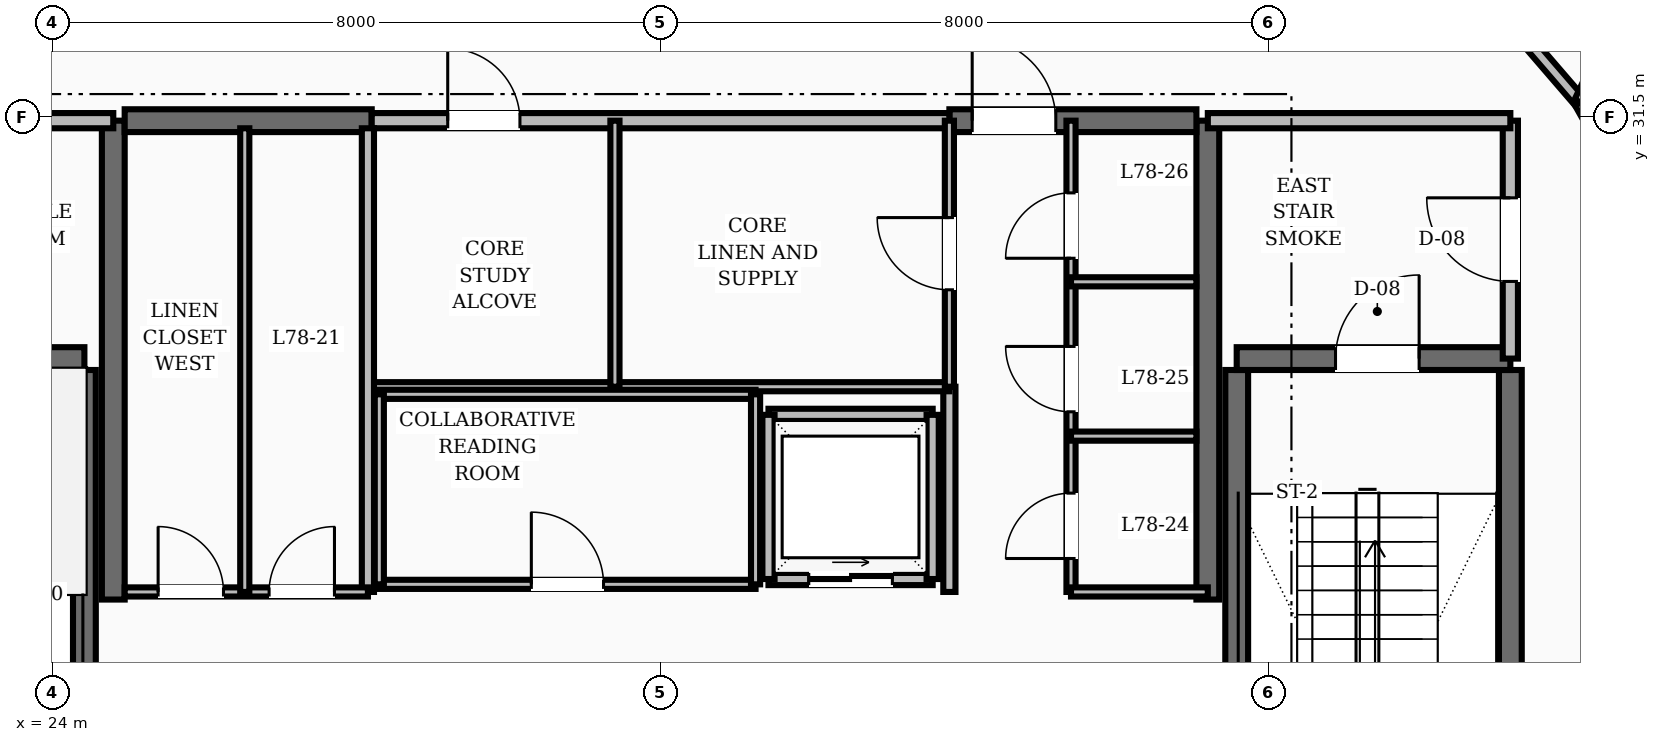
"""IFC4 building model, lengths in metres.
Left out: names, types, materials, properties, quantities, classifications, styles, units other than length and angle.
Written with IfcOpenShell. Run it as: python <this file> out.ifc"""

import sys

from ifc_helpers import new_model, si_unit, direction, frame, frame_2d, origin, place, context, subcontext, project, spatial, rectangle, extrude, element, fill, save


model = new_model("IFC4")
c1 = context("Model", 3, precision=1e-05, world=origin(), true_north=direction((0.0, 1.0)))
c2 = subcontext(c1, "Body", "Model", "MODEL_VIEW")
j1 = project(units=[si_unit("LENGTHUNIT", "METRE"), si_unit("PLANEANGLEUNIT", "RADIAN")], contexts=[c1])
p1 = place(None, origin())
s1 = spatial("IfcSite", under=j1, at=p1, CompositionType="ELEMENT")
p2 = place(p1, origin())
s2 = spatial("IfcBuilding", under=s1, at=p2, CompositionType="ELEMENT")
p3 = place(p2, frame((0.0, 0.0, 297.6)))
s3 = spatial("IfcBuildingStorey", under=s2, at=p3, CompositionType="ELEMENT", Elevation=297.6)
for number, where, z_axis, x_axis in (
    (1, (24.8, 25.15, 0.0), (0.0, 0.0, 1.0), (0.0, 1.0, 0.0)),
    (2, (39.2, 25.15, 0.0), (0.0, 0.0, 1.0), (0.0, 1.0, 0.0)),
):
    element("IfcWall", number, at=place(p3, frame(where, z_axis=z_axis, x_axis=x_axis)), inside=s3, PredefinedType="SHEAR", context=c2, shape_type="SweptSolid", body=[
        extrude(rectangle(XDim=6.3, YDim=0.3, at=frame_2d((3.15, 0.0))), origin(), (0.0, 0.0, 1.0), 4.8),
    ])
p4 = place(p3, frame((24.95, 31.45, 0.0), z_axis=(0.0, 0.0, 1.0), x_axis=(1.0, 0.0, 0.0)))
e3 = element("IfcWall", 3, at=p4, inside=s3, PredefinedType="SHEAR", context=c2, shape_type="SweptSolid", body=[
    extrude(rectangle(XDim=3.25, YDim=0.3, at=frame_2d((1.625, 0.0))), origin(), (0.0, 0.0, 1.0), 4.8),
])
p5 = place(p3, frame((35.8, 31.45, 0.0), z_axis=(0.0, 0.0, 1.0), x_axis=(1.0, 0.0, 0.0)))
e4 = element("IfcWall", 4, at=p5, inside=s3, PredefinedType="SHEAR", context=c2, shape_type="SweptSolid", body=[
    extrude(rectangle(XDim=3.25, YDim=0.3, at=frame_2d((1.625, 0.0))), origin(), (0.0, 0.0, 1.0), 4.8),
])
p6 = place(p5, frame((0.3, 0.0, 0.0)))
e5 = element("IfcOpeningElement", 5, at=p6, cuts=e4, PredefinedType="OPENING", context=c2, shape_type="SweptSolid", body=[
    extrude(rectangle(XDim=1.1, YDim=2.1, at=frame_2d((0.55, 1.05))), frame((0.0, 0.16, 0.0), z_axis=(0.0, -1.0, 0.0), x_axis=(1.0, 0.0, 0.0)), (0.0, 0.0, 1.0), 0.32),
])
p7 = place(p3, frame((24.42, 19.43, 0.0), z_axis=(0.0, 0.0, 1.0), x_axis=(0.0, 1.0, 0.0)))
e6 = element("IfcWall", 6, at=p7, inside=s3, PredefinedType="SHEAR", context=c2, shape_type="SweptSolid", body=[
    extrude(rectangle(XDim=8.74, YDim=0.3, at=frame_2d((4.37, 0.0))), origin(), (0.0, 0.0, 1.0), 4.8),
])
p8 = place(p3, frame((20.82, 28.32, 0.0), z_axis=(0.0, 0.0, 1.0), x_axis=(1.0, 0.0, 0.0)))
e7 = element("IfcWall", 7, at=p8, inside=s3, PredefinedType="SHEAR", context=c2, shape_type="SweptSolid", body=[
    extrude(rectangle(XDim=3.6, YDim=0.3, at=frame_2d((1.8, 0.0))), origin(), (0.0, 0.0, 1.0), 4.8),
])
for number, where, z_axis, x_axis in (
    (8, (43.18, 19.43, 0.0), (0.0, 0.0, 1.0), (0.0, 1.0, 0.0)),
    (9, (39.58, 19.43, 0.0), (0.0, 0.0, 1.0), (0.0, 1.0, 0.0)),
):
    element("IfcWall", number, at=place(p3, frame(where, z_axis=z_axis, x_axis=x_axis)), inside=s3, PredefinedType="SHEAR", context=c2, shape_type="SweptSolid", body=[
        extrude(rectangle(XDim=8.74, YDim=0.3, at=frame_2d((4.37, 0.0))), origin(), (0.0, 0.0, 1.0), 4.8),
    ])
p9 = place(p3, frame((39.58, 28.32, 0.0), z_axis=(0.0, 0.0, 1.0), x_axis=(1.0, 0.0, 0.0)))
e10 = element("IfcWall", 10, at=p9, inside=s3, PredefinedType="SHEAR", context=c2, shape_type="SweptSolid", body=[
    extrude(rectangle(XDim=3.6, YDim=0.3, at=frame_2d((1.8, 0.0))), origin(), (0.0, 0.0, 1.0), 4.8),
])
p10 = place(p9, frame((1.3, 0.0, 0.0)))
e11 = element("IfcOpeningElement", 11, at=p10, cuts=e10, PredefinedType="OPENING", context=c2, shape_type="SweptSolid", body=[
    extrude(rectangle(XDim=1.1, YDim=2.1, at=frame_2d((0.55, 1.05))), frame((0.0, 0.16, 0.0), z_axis=(0.0, -1.0, 0.0), x_axis=(1.0, 0.0, 0.0)), (0.0, 0.0, 1.0), 0.32),
])
p11 = place(p3, frame((43.18, 28.32, 0.0), z_axis=(0.0, 0.0, 1.0), x_axis=(0.0, 1.0, 0.0)))
e12 = element("IfcWall", 12, at=p11, inside=s3, PredefinedType="SOLIDWALL", context=c2, shape_type="SweptSolid", body=[
    extrude(rectangle(XDim=3.13, YDim=0.2, at=frame_2d((1.565, 0.0))), origin(), (0.0, 0.0, 1.0), 3.71),
])
p12 = place(p11, frame((1.015, 0.0, 0.0)))
e13 = element("IfcOpeningElement", 13, at=p12, cuts=e12, PredefinedType="OPENING", context=c2, shape_type="SweptSolid", body=[
    extrude(rectangle(XDim=1.1, YDim=2.1, at=frame_2d((0.55, 1.05))), frame((0.0, 0.11, 0.0), z_axis=(0.0, -1.0, 0.0), x_axis=(1.0, 0.0, 0.0)), (0.0, 0.0, 1.0), 0.22),
])
for number, where, z_axis, x_axis in (
    (14, (39.2, 31.45, 0.0), (0.0, 0.0, 1.0), (1.0, 0.0, 0.0)),
    (15, (20.82, 31.45, 0.0), (0.0, 0.0, 1.0), (1.0, 0.0, 0.0)),
):
    element("IfcWall", number, at=place(p3, frame(where, z_axis=z_axis, x_axis=x_axis)), inside=s3, PredefinedType="SOLIDWALL", context=c2, shape_type="SweptSolid", body=[
        extrude(rectangle(XDim=3.98, YDim=0.2, at=frame_2d((1.99, 0.0))), origin(), (0.0, 0.0, 1.0), 3.71),
    ])
p13 = place(p3, frame((35.8, 25.25, 0.0), z_axis=(0.0, 0.0, 1.0), x_axis=(0.0, 1.0, 0.0)))
e16 = element("IfcWall", 16, at=p13, inside=s3, PredefinedType="SOLIDWALL", context=c2, shape_type="SweptSolid", body=[
    extrude(rectangle(XDim=2.7, YDim=0.16, at=frame_2d((1.35, 0.0))), origin(), (0.0, 0.0, 1.0), 3.71),
])
p14 = place(p3, frame((33.42, 25.42, 0.0), z_axis=(0.0, 0.0, 1.0), x_axis=(1.0, 0.0, 0.0)))
e17 = element("IfcWall", 17, at=p14, inside=s3, PredefinedType="SOLIDWALL", context=c2, shape_type="SweptSolid", body=[
    extrude(rectangle(XDim=2.16, YDim=0.16, at=frame_2d((1.08, 0.0))), origin(), (0.0, 0.0, 1.0), 3.71),
])
p15 = place(p14, frame((0.53, 0.0, 0.0)))
e18 = element("IfcOpeningElement", 18, at=p15, cuts=e17, PredefinedType="OPENING", context=c2, shape_type="SweptSolid", body=[
    extrude(rectangle(XDim=1.1, YDim=2.15, at=frame_2d((0.55, 1.075))), frame((0.0, 0.09, 0.0), z_axis=(0.0, -1.0, 0.0), x_axis=(1.0, 0.0, 0.0)), (0.0, 0.0, 1.0), 0.18),
])
for number, where, z_axis, x_axis in (
    (19, (33.42, 27.58, 0.0), (0.0, 0.0, 1.0), (1.0, 0.0, 0.0)),
    (20, (33.42, 25.42, 0.0), (0.0, 0.0, 1.0), (0.0, 1.0, 0.0)),
    (21, (35.58, 25.42, 0.0), (0.0, 0.0, 1.0), (0.0, 1.0, 0.0)),
):
    element("IfcWall", number, at=place(p3, frame(where, z_axis=z_axis, x_axis=x_axis)), inside=s3, PredefinedType="SOLIDWALL", context=c2, shape_type="SweptSolid", body=[
        extrude(rectangle(XDim=2.16, YDim=0.16, at=frame_2d((1.08, 0.0))), origin(), (0.0, 0.0, 1.0), 3.71),
    ])
p16 = place(p3, frame((28.2, 31.45, 0.0), z_axis=(0.0, 0.0, 1.0), x_axis=(1.0, 0.0, 0.0)))
e22 = element("IfcWall", 22, at=p16, inside=s3, PredefinedType="SOLIDWALL", context=c2, shape_type="SweptSolid", body=[
    extrude(rectangle(XDim=7.6, YDim=0.2, at=frame_2d((3.8, 0.0))), origin(), (0.0, 0.0, 1.0), 3.71),
])
p17 = place(p16, frame((1.0, 0.0, 0.0)))
e23 = element("IfcOpeningElement", 23, at=p17, cuts=e22, PredefinedType="OPENING", context=c2, shape_type="SweptSolid", body=[
    extrude(rectangle(XDim=0.95, YDim=2.1, at=frame_2d((0.475, 1.05))), frame((0.0, 0.11, 0.0), z_axis=(0.0, -1.0, 0.0), x_axis=(1.0, 0.0, 0.0)), (0.0, 0.0, 1.0), 0.22),
])
p18 = place(p3, frame((28.2, 27.95, 0.0), z_axis=(0.0, 0.0, 1.0), x_axis=(1.0, 0.0, 0.0)))
e24 = element("IfcWall", 24, at=p18, inside=s3, PredefinedType="PARTITIONING", context=c2, shape_type="SweptSolid", body=[
    extrude(rectangle(XDim=7.6, YDim=0.12, at=frame_2d((3.8, 0.0))), origin(), (0.0, 0.0, 1.0), 3.71),
])
p19 = place(p3, frame((35.8, 27.95, 0.0), z_axis=(0.0, 0.0, 1.0), x_axis=(0.0, 1.0, 0.0)))
e25 = element("IfcWall", 25, at=p19, inside=s3, PredefinedType="PARTITIONING", context=c2, shape_type="SweptSolid", body=[
    extrude(rectangle(XDim=3.5, YDim=0.12, at=frame_2d((1.75, 0.0))), origin(), (0.0, 0.0, 1.0), 3.71),
])
p20 = place(p19, frame((1.275, 0.0, 0.0)))
e26 = element("IfcOpeningElement", 26, at=p20, cuts=e25, PredefinedType="OPENING", context=c2, shape_type="SweptSolid", body=[
    extrude(rectangle(XDim=0.95, YDim=2.1, at=frame_2d((0.475, 1.05))), frame((0.0, 0.07, 0.0), z_axis=(0.0, -1.0, 0.0), x_axis=(1.0, 0.0, 0.0)), (0.0, 0.0, 1.0), 0.14),
])
p21 = place(p3, frame((31.4, 27.95, 0.0), z_axis=(0.0, 0.0, 1.0), x_axis=(0.0, 1.0, 0.0)))
e27 = element("IfcWall", 27, at=p21, inside=s3, PredefinedType="PARTITIONING", context=c2, shape_type="SweptSolid", body=[
    extrude(rectangle(XDim=3.5, YDim=0.12, at=frame_2d((1.75, 0.0))), origin(), (0.0, 0.0, 1.0), 3.71),
])
p22 = place(p3, frame((28.3, 25.35, 0.0), z_axis=(0.0, 0.0, 1.0), x_axis=(1.0, 0.0, 0.0)))
e28 = element("IfcWall", 28, at=p22, inside=s3, PredefinedType="PARTITIONING", context=c2, shape_type="SweptSolid", body=[
    extrude(rectangle(XDim=4.95, YDim=0.12, at=frame_2d((2.475, 0.0))), origin(), (0.0, 0.0, 1.0), 3.71),
])
p23 = place(p22, frame((2.0, 0.0, 0.0)))
e29 = element("IfcOpeningElement", 29, at=p23, cuts=e28, PredefinedType="OPENING", context=c2, shape_type="SweptSolid", body=[
    extrude(rectangle(XDim=0.95, YDim=2.1, at=frame_2d((0.475, 1.05))), frame((0.0, 0.07, 0.0), z_axis=(0.0, -1.0, 0.0), x_axis=(1.0, 0.0, 0.0)), (0.0, 0.0, 1.0), 0.14),
])
p24 = place(p3, frame((28.3, 27.85, 0.0), z_axis=(0.0, 0.0, 1.0), x_axis=(1.0, 0.0, 0.0)))
e30 = element("IfcWall", 30, at=p24, inside=s3, PredefinedType="PARTITIONING", context=c2, shape_type="SweptSolid", body=[
    extrude(rectangle(XDim=4.95, YDim=0.12, at=frame_2d((2.475, 0.0))), origin(), (0.0, 0.0, 1.0), 3.71),
])
for number, where, z_axis, x_axis in (
    (31, (28.3, 25.35, 0.0), (0.0, 0.0, 1.0), (0.0, 1.0, 0.0)),
    (32, (33.25, 25.35, 0.0), (0.0, 0.0, 1.0), (0.0, 1.0, 0.0)),
):
    element("IfcWall", number, at=place(p3, frame(where, z_axis=z_axis, x_axis=x_axis)), inside=s3, PredefinedType="PARTITIONING", context=c2, shape_type="SweptSolid", body=[
        extrude(rectangle(XDim=2.5, YDim=0.12, at=frame_2d((1.25, 0.0))), origin(), (0.0, 0.0, 1.0), 3.71),
    ])
p25 = place(p3, frame((28.15, 25.25, 0.0), z_axis=(0.0, 0.0, 1.0), x_axis=(0.0, 1.0, 0.0)))
e33 = element("IfcWall", 33, at=p25, inside=s3, PredefinedType="SOLIDWALL", context=c2, shape_type="SweptSolid", body=[
    extrude(rectangle(XDim=6.1, YDim=0.16, at=frame_2d((3.05, 0.0))), origin(), (0.0, 0.0, 1.0), 3.71),
])
p26 = place(p3, frame((24.95, 25.25, 0.0), z_axis=(0.0, 0.0, 1.0), x_axis=(1.0, 0.0, 0.0)))
e34 = element("IfcWall", 34, at=p26, inside=s3, PredefinedType="PARTITIONING", context=c2, shape_type="SweptSolid", body=[
    extrude(rectangle(XDim=3.2, YDim=0.12, at=frame_2d((1.6, 0.0))), origin(), (0.0, 0.0, 1.0), 3.71),
])
p27 = place(p26, frame((0.44, 0.0, 0.0)))
e35 = element("IfcOpeningElement", 35, at=p27, cuts=e34, PredefinedType="OPENING", context=c2, shape_type="SweptSolid", body=[
    extrude(rectangle(XDim=0.86, YDim=2.1, at=frame_2d((0.43, 1.05))), frame((0.0, 0.07, 0.0), z_axis=(0.0, -1.0, 0.0), x_axis=(1.0, 0.0, 0.0)), (0.0, 0.0, 1.0), 0.14),
])
p28 = place(p26, frame((1.9, 0.0, 0.0)))
e36 = element("IfcOpeningElement", 36, at=p28, cuts=e34, PredefinedType="OPENING", context=c2, shape_type="SweptSolid", body=[
    extrude(rectangle(XDim=0.86, YDim=2.1, at=frame_2d((0.43, 1.05))), frame((0.0, 0.07, 0.0), z_axis=(0.0, -1.0, 0.0), x_axis=(1.0, 0.0, 0.0)), (0.0, 0.0, 1.0), 0.14),
])
p29 = place(p3, frame((37.4, 25.25, 0.0), z_axis=(0.0, 0.0, 1.0), x_axis=(0.0, 1.0, 0.0)))
e37 = element("IfcWall", 37, at=p29, inside=s3, PredefinedType="PARTITIONING", context=c2, shape_type="SweptSolid", body=[
    extrude(rectangle(XDim=6.2, YDim=0.12, at=frame_2d((3.1, 0.0))), origin(), (0.0, 0.0, 1.0), 3.71),
])
p30 = place(p29, frame((0.44, 0.0, 0.0)))
e38 = element("IfcOpeningElement", 38, at=p30, cuts=e37, PredefinedType="OPENING", context=c2, shape_type="SweptSolid", body=[
    extrude(rectangle(XDim=0.86, YDim=2.1, at=frame_2d((0.43, 1.05))), frame((0.0, 0.07, 0.0), z_axis=(0.0, -1.0, 0.0), x_axis=(1.0, 0.0, 0.0)), (0.0, 0.0, 1.0), 0.14),
])
p31 = place(p29, frame((2.37, 0.0, 0.0)))
e39 = element("IfcOpeningElement", 39, at=p31, cuts=e37, PredefinedType="OPENING", context=c2, shape_type="SweptSolid", body=[
    extrude(rectangle(XDim=0.86, YDim=2.1, at=frame_2d((0.43, 1.05))), frame((0.0, 0.07, 0.0), z_axis=(0.0, -1.0, 0.0), x_axis=(1.0, 0.0, 0.0)), (0.0, 0.0, 1.0), 0.14),
])
p32 = place(p29, frame((4.39, 0.0, 0.0)))
e40 = element("IfcOpeningElement", 40, at=p32, cuts=e37, PredefinedType="OPENING", context=c2, shape_type="SweptSolid", body=[
    extrude(rectangle(XDim=0.86, YDim=2.1, at=frame_2d((0.43, 1.05))), frame((0.0, 0.07, 0.0), z_axis=(0.0, -1.0, 0.0), x_axis=(1.0, 0.0, 0.0)), (0.0, 0.0, 1.0), 0.14),
])
p33 = place(p3, frame((37.4, 25.25, 0.0), z_axis=(0.0, 0.0, 1.0), x_axis=(1.0, 0.0, 0.0)))
e41 = element("IfcWall", 41, at=p33, inside=s3, PredefinedType="PARTITIONING", context=c2, shape_type="SweptSolid", body=[
    extrude(rectangle(XDim=1.8, YDim=0.12, at=frame_2d((0.9, 0.0))), origin(), (0.0, 0.0, 1.0), 3.71),
])
p34 = place(p3, frame((26.53, 25.25, 0.0), z_axis=(0.0, 0.0, 1.0), x_axis=(0.0, 1.0, 0.0)))
e42 = element("IfcWall", 42, at=p34, inside=s3, PredefinedType="PARTITIONING", context=c2, shape_type="SweptSolid", body=[
    extrude(rectangle(XDim=6.1, YDim=0.12, at=frame_2d((3.05, 0.0))), origin(), (0.0, 0.0, 1.0), 3.71),
])
for number, where, z_axis, x_axis in (
    (43, (37.4, 27.3, 0.0), (0.0, 0.0, 1.0), (1.0, 0.0, 0.0)),
    (44, (37.4, 29.33, 0.0), (0.0, 0.0, 1.0), (1.0, 0.0, 0.0)),
):
    element("IfcWall", number, at=place(p3, frame(where, z_axis=z_axis, x_axis=x_axis)), inside=s3, PredefinedType="PARTITIONING", context=c2, shape_type="SweptSolid", body=[
        extrude(rectangle(XDim=1.65, YDim=0.12, at=frame_2d((0.825, 0.0))), origin(), (0.0, 0.0, 1.0), 3.71),
    ])
p35 = place(p3, frame((45.442, 29.3, 0.0), z_axis=(0.0, 0.0, 1.0), x_axis=(-0.48962370511, 0.871933843474, 0.0)))
e45 = element("IfcWall", 45, at=p35, inside=s3, PredefinedType="SOLIDWALL", context=c2, shape_type="SweptSolid", body=[
    extrude(rectangle(XDim=2.746, YDim=0.16, at=frame_2d((1.373, 0.0))), origin(), (0.0, 0.0, 1.0), 3.71),
])
p36 = place(p3, frame((44.098, 31.695, 0.0), z_axis=(0.0, 0.0, 1.0), x_axis=(-0.652979703778, 0.757375406555, 0.0)))
e46 = element("IfcWall", 46, at=p36, inside=s3, PredefinedType="SOLIDWALL", context=c2, shape_type="SweptSolid", body=[
    extrude(rectangle(XDim=2.771, YDim=0.16, at=frame_2d((1.386, 0.0))), origin(), (0.0, 0.0, 1.0), 3.71),
])
p37 = place(p3, frame((44.098, 31.695, 0.0), z_axis=(0.0, 0.0, 1.0), x_axis=(0.426360697911, 0.904553235181, 0.0)))
e47 = element("IfcWall", 47, at=p37, inside=s3, PredefinedType="SOLIDWALL", context=c2, shape_type="SweptSolid", body=[
    extrude(rectangle(XDim=3.9, YDim=0.16, at=frame_2d((1.95, 0.0))), origin(), (0.0, 0.0, 1.0), 3.71),
])
p38 = place(p10, origin())
e48 = element("IfcDoor", 48, at=p38, inside=s3, OperationType="SINGLE_SWING_RIGHT", PredefinedType="DOOR", context=c2, shape_type="SweptSolid", body=[
    extrude(rectangle(XDim=1.1, YDim=2.1, at=frame_2d((0.55, 1.05))), frame((0.0, 0.025, 0.0), z_axis=(0.0, -1.0, 0.0), x_axis=(1.0, 0.0, 0.0)), (0.0, 0.0, 1.0), 0.05),
])
fill(e11, e48)
p39 = place(p12, origin())
e49 = element("IfcDoor", 49, at=p39, inside=s3, OperationType="SINGLE_SWING_RIGHT", PredefinedType="DOOR", context=c2, shape_type="SweptSolid", body=[
    extrude(rectangle(XDim=1.1, YDim=2.1, at=frame_2d((0.55, 1.05))), frame((0.0, 0.025, 0.0), z_axis=(0.0, -1.0, 0.0), x_axis=(1.0, 0.0, 0.0)), (0.0, 0.0, 1.0), 0.05),
])
fill(e13, e49)
p40 = place(p6, origin())
e50 = element("IfcDoor", 50, at=p40, inside=s3, OperationType="SINGLE_SWING_LEFT", PredefinedType="DOOR", context=c2, shape_type="SweptSolid", body=[
    extrude(rectangle(XDim=1.1, YDim=2.1, at=frame_2d((0.55, 1.05))), frame((0.0, 0.025, 0.0), z_axis=(0.0, -1.0, 0.0), x_axis=(1.0, 0.0, 0.0)), (0.0, 0.0, 1.0), 0.05),
])
fill(e5, e50)
p41 = place(p15, origin())
e51 = element("IfcDoor", 51, at=p41, inside=s3, OperationType="SLIDING_TO_RIGHT", PredefinedType="DOOR", context=c2, shape_type="SweptSolid", body=[
    extrude(rectangle(XDim=1.1, YDim=2.15, at=frame_2d((0.55, 1.075))), frame((0.0, 0.025, 0.0), z_axis=(0.0, -1.0, 0.0), x_axis=(1.0, 0.0, 0.0)), (0.0, 0.0, 1.0), 0.05),
])
fill(e18, e51)
p42 = place(p17, origin())
e52 = element("IfcDoor", 52, at=p42, inside=s3, OperationType="SINGLE_SWING_LEFT", PredefinedType="DOOR", context=c2, shape_type="SweptSolid", body=[
    extrude(rectangle(XDim=0.95, YDim=2.1, at=frame_2d((0.475, 1.05))), frame((0.0, 0.025, 0.0), z_axis=(0.0, -1.0, 0.0), x_axis=(1.0, 0.0, 0.0)), (0.0, 0.0, 1.0), 0.05),
])
fill(e23, e52)
p43 = place(p20, origin())
e53 = element("IfcDoor", 53, at=p43, inside=s3, OperationType="SINGLE_SWING_RIGHT", PredefinedType="DOOR", context=c2, shape_type="SweptSolid", body=[
    extrude(rectangle(XDim=0.95, YDim=2.1, at=frame_2d((0.475, 1.05))), frame((0.0, 0.025, 0.0), z_axis=(0.0, -1.0, 0.0), x_axis=(1.0, 0.0, 0.0)), (0.0, 0.0, 1.0), 0.05),
])
fill(e26, e53)
p44 = place(p23, origin())
e54 = element("IfcDoor", 54, at=p44, inside=s3, OperationType="SINGLE_SWING_LEFT", PredefinedType="DOOR", context=c2, shape_type="SweptSolid", body=[
    extrude(rectangle(XDim=0.95, YDim=2.1, at=frame_2d((0.475, 1.05))), frame((0.0, 0.025, 0.0), z_axis=(0.0, -1.0, 0.0), x_axis=(1.0, 0.0, 0.0)), (0.0, 0.0, 1.0), 0.05),
])
fill(e29, e54)
p45 = place(p27, origin())
e55 = element("IfcDoor", 55, at=p45, inside=s3, OperationType="SINGLE_SWING_LEFT", PredefinedType="DOOR", context=c2, shape_type="SweptSolid", body=[
    extrude(rectangle(XDim=0.86, YDim=2.1, at=frame_2d((0.43, 1.05))), frame((0.0, 0.025, 0.0), z_axis=(0.0, -1.0, 0.0), x_axis=(1.0, 0.0, 0.0)), (0.0, 0.0, 1.0), 0.05),
])
fill(e35, e55)
p46 = place(p28, origin())
e56 = element("IfcDoor", 56, at=p46, inside=s3, OperationType="SINGLE_SWING_RIGHT", PredefinedType="DOOR", context=c2, shape_type="SweptSolid", body=[
    extrude(rectangle(XDim=0.86, YDim=2.1, at=frame_2d((0.43, 1.05))), frame((0.0, 0.025, 0.0), z_axis=(0.0, -1.0, 0.0), x_axis=(1.0, 0.0, 0.0)), (0.0, 0.0, 1.0), 0.05),
])
fill(e36, e56)
p47 = place(p30, origin())
e57 = element("IfcDoor", 57, at=p47, inside=s3, OperationType="SINGLE_SWING_LEFT", PredefinedType="DOOR", context=c2, shape_type="SweptSolid", body=[
    extrude(rectangle(XDim=0.86, YDim=2.1, at=frame_2d((0.43, 1.05))), frame((0.0, 0.025, 0.0), z_axis=(0.0, -1.0, 0.0), x_axis=(1.0, 0.0, 0.0)), (0.0, 0.0, 1.0), 0.05),
])
fill(e38, e57)
p48 = place(p31, origin())
e58 = element("IfcDoor", 58, at=p48, inside=s3, OperationType="SINGLE_SWING_RIGHT", PredefinedType="DOOR", context=c2, shape_type="SweptSolid", body=[
    extrude(rectangle(XDim=0.86, YDim=2.1, at=frame_2d((0.43, 1.05))), frame((0.0, 0.025, 0.0), z_axis=(0.0, -1.0, 0.0), x_axis=(1.0, 0.0, 0.0)), (0.0, 0.0, 1.0), 0.05),
])
fill(e39, e58)
p49 = place(p32, origin())
e59 = element("IfcDoor", 59, at=p49, inside=s3, OperationType="SINGLE_SWING_LEFT", PredefinedType="DOOR", context=c2, shape_type="SweptSolid", body=[
    extrude(rectangle(XDim=0.86, YDim=2.1, at=frame_2d((0.43, 1.05))), frame((0.0, 0.025, 0.0), z_axis=(0.0, -1.0, 0.0), x_axis=(1.0, 0.0, 0.0)), (0.0, 0.0, 1.0), 0.05),
])
fill(e40, e59)
save(model, sys.argv[1])
